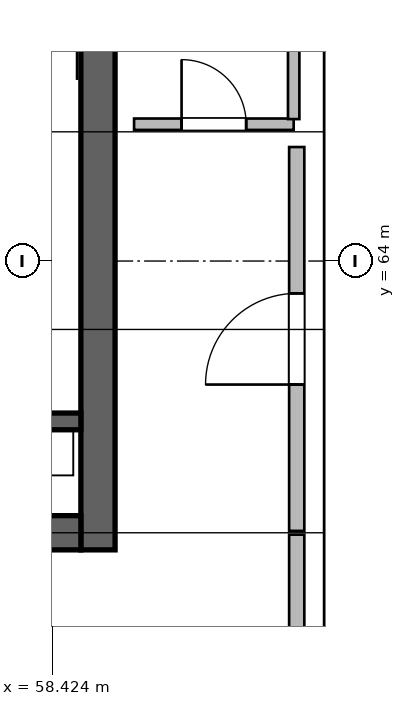
"""IFC4 building model, lengths in metres.
Left out: names, types, materials, properties, quantities, classifications, styles, units other than length and angle.
Written with IfcOpenShell. Run it as: python <this file> out.ifc"""

import sys

from ifc_helpers import new_model, si_unit, direction, frame, frame_2d, origin, place, context, subcontext, project, spatial, rectangle, extrude, source, transform, mapped, element, fill, save


model = new_model("IFC4")
c1 = context("Model", 3, precision=1e-05, world=origin(), true_north=direction((0.0, 1.0)))
c2 = subcontext(c1, "Body", "Model", "MODEL_VIEW")
j1 = project(units=[si_unit("LENGTHUNIT", "METRE"), si_unit("PLANEANGLEUNIT", "RADIAN")], contexts=[c1])
p1 = place(None, origin())
s1 = spatial("IfcSite", under=j1, at=p1, CompositionType="ELEMENT")
p2 = place(p1, origin())
s2 = spatial("IfcBuilding", under=s1, at=p2, CompositionType="ELEMENT")
p3 = place(p2, frame((0.0, 0.0, 189.6)))
s3 = spatial("IfcBuildingStorey", under=s2, at=p3, CompositionType="ELEMENT", Elevation=189.6)
m1 = source(origin(), c2, "Body", "SweptSolid", [
    extrude(rectangle(XDim=12.0, YDim=0.45, at=frame_2d((6.0, 0.0))), origin(), (0.0, 0.0, 1.0), 4.8),
])
p4 = place(p3, frame((59.025, 60.2, 0.0), z_axis=(0.0, 0.0, 1.0), x_axis=(0.0, 1.0, 0.0)))
e1 = element("IfcWall", 1, at=p4, inside=s3, PredefinedType="SHEAR", context=c2, shape_type="MappedRepresentation", body=[
    mapped(m1, transform((0.0, 0.0, 0.0), scale=1.0)),
])
m2 = source(origin(), c2, "Body", "SweptSolid", [
    extrude(rectangle(XDim=21.6, YDim=0.45, at=frame_2d((10.8, 0.0))), origin(), (0.0, 0.0, 1.0), 4.8),
])
p5 = place(p3, frame((37.2, 60.425, 0.0), z_axis=(0.0, 0.0, 1.0), x_axis=(1.0, 0.0, 0.0)))
e2 = element("IfcWall", 2, at=p5, inside=s3, PredefinedType="SHEAR", context=c2, shape_type="MappedRepresentation", body=[
    mapped(m2, transform((0.0, 0.0, 0.0), scale=1.0)),
])
p6 = place(p5, frame((1.1, 0.0, 0.0)))
e3 = element("IfcOpeningElement", 3, at=p6, cuts=e2, PredefinedType="OPENING", context=c2, shape_type="SweptSolid", body=[
    extrude(rectangle(XDim=1.15, YDim=2.15, at=frame_2d((0.575, 1.075))), frame((0.0, 0.235, 0.0), z_axis=(0.0, -1.0, 0.0), x_axis=(1.0, 0.0, 0.0)), (0.0, 0.0, 1.0), 0.47),
])
p7 = place(p5, frame((19.5, 0.0, 0.0)))
e4 = element("IfcOpeningElement", 4, at=p7, cuts=e2, PredefinedType="OPENING", context=c2, shape_type="SweptSolid", body=[
    extrude(rectangle(XDim=0.9, YDim=2.1, at=frame_2d((0.45, 1.05))), frame((0.0, 0.235, 0.0), z_axis=(0.0, -1.0, 0.0), x_axis=(1.0, 0.0, 0.0)), (0.0, 0.0, 1.0), 0.47),
])
p8 = place(p5, frame((12.02, 0.0, 0.0)))
e5 = element("IfcOpeningElement", 5, at=p8, cuts=e2, PredefinedType="OPENING", context=c2, shape_type="SweptSolid", body=[
    extrude(rectangle(XDim=1.6, YDim=2.15, at=frame_2d((0.8, 1.075))), frame((0.0, 0.235, 0.0), z_axis=(0.0, -1.0, 0.0), x_axis=(1.0, 0.0, 0.0)), (0.0, 0.0, 1.0), 0.47),
])
m3 = source(origin(), c2, "Body", "SweptSolid", [
    extrude(rectangle(XDim=3.27, YDim=0.22, at=frame_2d((1.635, 0.0))), origin(), (0.0, 0.0, 1.0), 4.8),
])
p9 = place(p3, frame((55.53, 61.89, 0.0), z_axis=(0.0, 0.0, 1.0), x_axis=(1.0, 0.0, 0.0)))
e6 = element("IfcWall", 6, at=p9, inside=s3, PredefinedType="SHEAR", context=c2, shape_type="MappedRepresentation", body=[
    mapped(m3, transform((0.0, 0.0, 0.0), scale=1.0)),
])
m4 = source(origin(), c2, "Body", "SweptSolid", [
    extrude(rectangle(XDim=2.1, YDim=0.15, at=frame_2d((1.05, 0.0))), origin(), (0.0, 0.0, 1.0), 4.48),
])
p10 = place(p3, frame((59.5, 65.8, 0.0), z_axis=(0.0, 0.0, 1.0), x_axis=(1.0, 0.0, 0.0)))
e7 = element("IfcWall", 7, at=p10, inside=s3, PredefinedType="PARTITIONING", context=c2, shape_type="MappedRepresentation", body=[
    mapped(m4, transform((0.0, 0.0, 0.0), scale=1.0)),
])
p11 = place(p10, frame((0.625, 0.0, 0.0)))
e8 = element("IfcOpeningElement", 8, at=p11, cuts=e7, PredefinedType="OPENING", context=c2, shape_type="SweptSolid", body=[
    extrude(rectangle(XDim=0.85, YDim=2.1, at=frame_2d((0.425, 1.05))), frame((0.0, 0.085, 0.0), z_axis=(0.0, -1.0, 0.0), x_axis=(1.0, 0.0, 0.0)), (0.0, 0.0, 1.0), 0.17),
])
m5 = source(origin(), c2, "Body", "SweptSolid", [
    extrude(rectangle(XDim=3.565, YDim=0.15, at=frame_2d((1.783, 0.0))), origin(), (0.0, 0.0, 1.0), 4.48),
])
p12 = place(p3, frame((61.6, 65.867, 0.0), z_axis=(0.0, 0.0, 1.0), x_axis=(0.0, 1.0, 0.0)))
e9 = element("IfcWall", 9, at=p12, inside=s3, PredefinedType="PARTITIONING", context=c2, shape_type="MappedRepresentation", body=[
    mapped(m5, transform((0.0, 0.0, 0.0), scale=1.0)),
])
m6 = source(origin(), c2, "Body", "SweptSolid", [
    extrude(rectangle(XDim=12.336, YDim=0.2, at=frame_2d((6.168, 0.0))), origin(), (0.0, 0.0, 1.0), 3.772),
])
p13 = place(p3, frame((61.64, 48.064, 0.0), z_axis=(0.0, 0.0, 1.0), x_axis=(0.0, 1.0, 0.0)))
e10 = element("IfcWall", 10, at=p13, inside=s3, PredefinedType="SOLIDWALL", context=c2, shape_type="MappedRepresentation", body=[
    mapped(m6, transform((0.0, 0.0, 0.0), scale=1.0)),
])
m7 = source(origin(), c2, "Body", "SweptSolid", [
    extrude(rectangle(XDim=5.05, YDim=0.2, at=frame_2d((2.525, 0.0))), origin(), (0.0, 0.0, 1.0), 4.48),
])
p14 = place(p3, frame((61.64, 60.45, 0.0), z_axis=(0.0, 0.0, 1.0), x_axis=(0.0, 1.0, 0.0)))
e11 = element("IfcWall", 11, at=p14, inside=s3, PredefinedType="SOLIDWALL", context=c2, shape_type="MappedRepresentation", body=[
    mapped(m7, transform((0.0, 0.0, 0.0), scale=1.0)),
])
p15 = place(p14, frame((1.925, 0.0, 0.0)))
e12 = element("IfcOpeningElement", 12, at=p15, cuts=e11, PredefinedType="OPENING", context=c2, shape_type="SweptSolid", body=[
    extrude(rectangle(XDim=1.2, YDim=2.15, at=frame_2d((0.6, 1.075))), frame((0.0, 0.11, 0.0), z_axis=(0.0, -1.0, 0.0), x_axis=(1.0, 0.0, 0.0)), (0.0, 0.0, 1.0), 0.22),
])
m8 = source(origin(), c2, "Body", "SweptSolid", [
    extrude(rectangle(XDim=0.85, YDim=2.1, at=frame_2d((0.425, 1.05))), frame((0.0, 0.025, 0.0), z_axis=(0.0, -1.0, 0.0), x_axis=(1.0, 0.0, 0.0)), (0.0, 0.0, 1.0), 0.05),
])
p16 = place(p11, origin())
e13 = element("IfcDoor", 13, at=p16, inside=s3, OperationType="SINGLE_SWING_LEFT", PredefinedType="DOOR", context=c2, shape_type="MappedRepresentation", body=[
    mapped(m8, transform((0.0, 0.0, 0.0), scale=1.0)),
])
fill(e8, e13)
m9 = source(origin(), c2, "Body", "SweptSolid", [
    extrude(rectangle(XDim=1.2, YDim=2.15, at=frame_2d((0.6, 1.075))), frame((0.0, 0.025, 0.0), z_axis=(0.0, -1.0, 0.0), x_axis=(1.0, 0.0, 0.0)), (0.0, 0.0, 1.0), 0.05),
])
p17 = place(p15, origin())
e14 = element("IfcDoor", 14, at=p17, inside=s3, OperationType="SINGLE_SWING_LEFT", PredefinedType="DOOR", context=c2, shape_type="MappedRepresentation", body=[
    mapped(m9, transform((0.0, 0.0, 0.0), scale=1.0)),
])
fill(e12, e14)
save(model, sys.argv[1])
